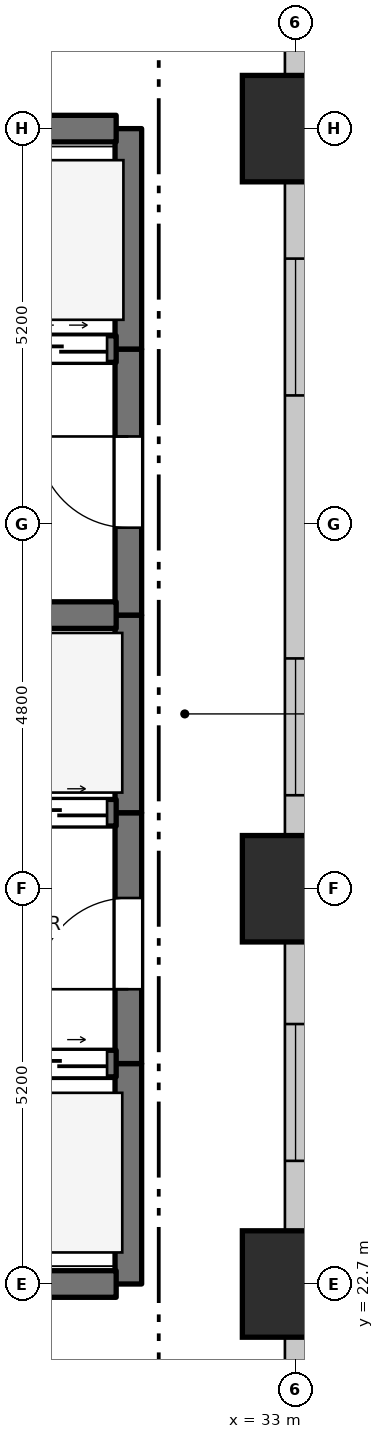
"""IFC4 building model, lengths in metres.
Left out: names, types, materials, properties, quantities, classifications, styles, units other than length and angle.
Written with IfcOpenShell. Run it as: python <this file> out.ifc"""

import sys

from ifc_helpers import new_model, si_unit, direction, frame, frame_2d, origin, origin_2d, place, context, subcontext, project, spatial, rectangle, extrude, element, fill, save


model = new_model("IFC4")
c1 = context("Model", 3, precision=1e-05, world=origin(), true_north=direction((0.0, 1.0)))
c2 = subcontext(c1, "Body", "Model", "MODEL_VIEW")
j1 = project(units=[si_unit("LENGTHUNIT", "METRE"), si_unit("PLANEANGLEUNIT", "RADIAN")], contexts=[c1])
p1 = place(None, origin())
s1 = spatial("IfcSite", under=j1, at=p1, CompositionType="ELEMENT")
p2 = place(p1, origin())
s2 = spatial("IfcBuilding", under=s1, at=p2, CompositionType="ELEMENT")
p3 = place(p2, frame((0.0, 0.0, 6.5)))
s3 = spatial("IfcBuildingStorey", under=s2, at=p3, CompositionType="ELEMENT", Elevation=6.5)
for number, where, z_axis, x_axis in (
    (1, (33.0, 22.7, 0.0), (0.0, 0.0, 1.0), (1.0, 0.0, 0.0)),
    (2, (33.0, 27.9, 0.0), (0.0, 0.0, 1.0), (1.0, 0.0, 0.0)),
    (3, (33.0, 37.9, 0.0), (0.0, 0.0, 1.0), (1.0, 0.0, 0.0)),
):
    element("IfcColumn", number, at=place(p3, frame(where, z_axis=z_axis, x_axis=x_axis)), inside=s3, PredefinedType="PILASTER", context=c2, shape_type="SweptSolid", body=[
        extrude(rectangle(XDim=1.4, YDim=1.4, at=origin_2d()), origin(), (0.0, 0.0, 1.0), 6.5),
    ])
p4 = place(p3, frame((33.0, 54.1, 0.0), z_axis=(0.0, 0.0, 1.0), x_axis=(0.0, -1.0, 0.0)))
e4 = element("IfcWall", 4, at=p4, inside=s3, PredefinedType="STANDARD", context=c2, shape_type="SweptSolid", body=[
    extrude(rectangle(XDim=26.2, YDim=0.28, at=frame_2d((13.1, 0.0))), origin(), (0.0, 0.0, 1.0), 5.57),
])
p5 = place(p4, frame((2.13, 0.0, 0.95)))
e5 = element("IfcOpeningElement", 5, at=p5, cuts=e4, PredefinedType="OPENING", context=c2, shape_type="SweptSolid", body=[
    extrude(rectangle(XDim=1.8, YDim=1.8, at=frame_2d((0.9, 0.9))), frame((0.0, 0.15, 0.0), z_axis=(0.0, -1.0, 0.0), x_axis=(1.0, 0.0, 0.0)), (0.0, 0.0, 1.0), 0.3),
])
p6 = place(p4, frame((7.39, 0.0, 0.95)))
e6 = element("IfcOpeningElement", 6, at=p6, cuts=e4, PredefinedType="OPENING", context=c2, shape_type="SweptSolid", body=[
    extrude(rectangle(XDim=1.8, YDim=1.8, at=frame_2d((0.9, 0.9))), frame((0.0, 0.15, 0.0), z_axis=(0.0, -1.0, 0.0), x_axis=(1.0, 0.0, 0.0)), (0.0, 0.0, 1.0), 0.3),
])
p7 = place(p4, frame((12.65, 0.0, 0.95)))
e7 = element("IfcOpeningElement", 7, at=p7, cuts=e4, PredefinedType="OPENING", context=c2, shape_type="SweptSolid", body=[
    extrude(rectangle(XDim=1.8, YDim=1.8, at=frame_2d((0.9, 0.9))), frame((0.0, 0.15, 0.0), z_axis=(0.0, -1.0, 0.0), x_axis=(1.0, 0.0, 0.0)), (0.0, 0.0, 1.0), 0.3),
])
p8 = place(p4, frame((17.91, 0.0, 0.95)))
e8 = element("IfcOpeningElement", 8, at=p8, cuts=e4, PredefinedType="OPENING", context=c2, shape_type="SweptSolid", body=[
    extrude(rectangle(XDim=1.8, YDim=1.8, at=frame_2d((0.9, 0.9))), frame((0.0, 0.15, 0.0), z_axis=(0.0, -1.0, 0.0), x_axis=(1.0, 0.0, 0.0)), (0.0, 0.0, 1.0), 0.3),
])
p9 = place(p4, frame((23.17, 0.0, 0.95)))
e9 = element("IfcOpeningElement", 9, at=p9, cuts=e4, PredefinedType="OPENING", context=c2, shape_type="SweptSolid", body=[
    extrude(rectangle(XDim=1.8, YDim=1.8, at=frame_2d((0.9, 0.9))), frame((0.0, 0.15, 0.0), z_axis=(0.0, -1.0, 0.0), x_axis=(1.0, 0.0, 0.0)), (0.0, 0.0, 1.0), 0.3),
])
p10 = place(p3, frame((30.8, 22.7, 0.0), z_axis=(0.0, 0.0, 1.0), x_axis=(0.0, 1.0, 0.0)))
e10 = element("IfcWall", 10, at=p10, inside=s3, PredefinedType="SHEAR", context=c2, shape_type="SweptSolid", body=[
    extrude(rectangle(XDim=2.9, YDim=0.35, at=frame_2d((1.45, 0.0))), origin(), (0.0, 0.0, 1.0), 6.17),
])
p11 = place(p3, frame((30.8, 25.6, 0.0), z_axis=(0.0, 0.0, 1.0), x_axis=(0.0, 1.0, 0.0)))
e11 = element("IfcWall", 11, at=p11, inside=s3, PredefinedType="SHEAR", context=c2, shape_type="SweptSolid", body=[
    extrude(rectangle(XDim=3.3, YDim=0.35, at=frame_2d((1.65, 0.0))), origin(), (0.0, 0.0, 1.0), 6.17),
])
p12 = place(p11, frame((0.978, 0.0, 0.0)))
e12 = element("IfcOpeningElement", 12, at=p12, cuts=e11, PredefinedType="OPENING", context=c2, shape_type="SweptSolid", body=[
    extrude(rectangle(XDim=1.2, YDim=2.2, at=frame_2d((0.6, 1.1))), frame((0.0, 0.185, 0.0), z_axis=(0.0, -1.0, 0.0), x_axis=(1.0, 0.0, 0.0)), (0.0, 0.0, 1.0), 0.37),
])
p13 = place(p3, frame((30.8, 28.9, 0.0), z_axis=(0.0, 0.0, 1.0), x_axis=(0.0, 1.0, 0.0)))
e13 = element("IfcWall", 13, at=p13, inside=s3, PredefinedType="SHEAR", context=c2, shape_type="SweptSolid", body=[
    extrude(rectangle(XDim=2.6, YDim=0.35, at=frame_2d((1.3, 0.0))), origin(), (0.0, 0.0, 1.0), 6.17),
])
p14 = place(p3, frame((30.8, 31.5, 0.0), z_axis=(0.0, 0.0, 1.0), x_axis=(0.0, 1.0, 0.0)))
e14 = element("IfcWall", 14, at=p14, inside=s3, PredefinedType="SHEAR", context=c2, shape_type="SweptSolid", body=[
    extrude(rectangle(XDim=3.5, YDim=0.35, at=frame_2d((1.75, 0.0))), origin(), (0.0, 0.0, 1.0), 6.17),
])
p15 = place(p14, frame((1.15, 0.0, 0.0)))
e15 = element("IfcOpeningElement", 15, at=p15, cuts=e14, PredefinedType="OPENING", context=c2, shape_type="SweptSolid", body=[
    extrude(rectangle(XDim=1.2, YDim=2.2, at=frame_2d((0.6, 1.1))), frame((0.0, 0.185, 0.0), z_axis=(0.0, -1.0, 0.0), x_axis=(1.0, 0.0, 0.0)), (0.0, 0.0, 1.0), 0.37),
])
p16 = place(p3, frame((30.8, 35.0, 0.0), z_axis=(0.0, 0.0, 1.0), x_axis=(0.0, 1.0, 0.0)))
e16 = element("IfcWall", 16, at=p16, inside=s3, PredefinedType="SHEAR", context=c2, shape_type="SweptSolid", body=[
    extrude(rectangle(XDim=2.9, YDim=0.35, at=frame_2d((1.45, 0.0))), origin(), (0.0, 0.0, 1.0), 6.17),
])
p17 = place(p3, frame((27.46, 22.7, 0.0), z_axis=(0.0, 0.0, 1.0), x_axis=(1.0, 0.0, 0.0)))
e17 = element("IfcWall", 17, at=p17, inside=s3, PredefinedType="SHEAR", context=c2, shape_type="SweptSolid", body=[
    extrude(rectangle(XDim=3.18, YDim=0.35, at=frame_2d((1.59, 0.0))), origin(), (0.0, 0.0, 1.0), 6.17),
])
p18 = place(p3, frame((27.46, 25.6, 0.0), z_axis=(0.0, 0.0, 1.0), x_axis=(1.0, 0.0, 0.0)))
e18 = element("IfcWall", 18, at=p18, inside=s3, PredefinedType="SHEAR", context=c2, shape_type="SweptSolid", body=[
    extrude(rectangle(XDim=3.18, YDim=0.35, at=frame_2d((1.59, 0.0))), origin(), (0.0, 0.0, 1.0), 6.17),
])
p19 = place(p18, frame((0.12, 0.0, 0.0)))
e19 = element("IfcOpeningElement", 19, at=p19, cuts=e18, PredefinedType="OPENING", context=c2, shape_type="SweptSolid", body=[
    extrude(rectangle(XDim=1.25, YDim=2.2, at=frame_2d((0.625, 1.1))), frame((0.0, 0.185, 0.0), z_axis=(0.0, -1.0, 0.0), x_axis=(1.0, 0.0, 0.0)), (0.0, 0.0, 1.0), 0.37),
])
p20 = place(p18, frame((1.81, 0.0, 0.0)))
e20 = element("IfcOpeningElement", 20, at=p20, cuts=e18, PredefinedType="OPENING", context=c2, shape_type="SweptSolid", body=[
    extrude(rectangle(XDim=1.25, YDim=2.2, at=frame_2d((0.625, 1.1))), frame((0.0, 0.185, 0.0), z_axis=(0.0, -1.0, 0.0), x_axis=(1.0, 0.0, 0.0)), (0.0, 0.0, 1.0), 0.37),
])
p21 = place(p3, frame((27.46, 28.9, 0.0), z_axis=(0.0, 0.0, 1.0), x_axis=(1.0, 0.0, 0.0)))
e21 = element("IfcWall", 21, at=p21, inside=s3, PredefinedType="SHEAR", context=c2, shape_type="SweptSolid", body=[
    extrude(rectangle(XDim=3.18, YDim=0.35, at=frame_2d((1.59, 0.0))), origin(), (0.0, 0.0, 1.0), 6.17),
])
p22 = place(p21, frame((0.12, 0.0, 0.0)))
e22 = element("IfcOpeningElement", 22, at=p22, cuts=e21, PredefinedType="OPENING", context=c2, shape_type="SweptSolid", body=[
    extrude(rectangle(XDim=1.25, YDim=2.2, at=frame_2d((0.625, 1.1))), frame((0.0, 0.185, 0.0), z_axis=(0.0, -1.0, 0.0), x_axis=(1.0, 0.0, 0.0)), (0.0, 0.0, 1.0), 0.37),
])
p23 = place(p21, frame((1.81, 0.0, 0.0)))
e23 = element("IfcOpeningElement", 23, at=p23, cuts=e21, PredefinedType="OPENING", context=c2, shape_type="SweptSolid", body=[
    extrude(rectangle(XDim=1.25, YDim=2.2, at=frame_2d((0.625, 1.1))), frame((0.0, 0.185, 0.0), z_axis=(0.0, -1.0, 0.0), x_axis=(1.0, 0.0, 0.0)), (0.0, 0.0, 1.0), 0.37),
])
p24 = place(p3, frame((27.46, 31.5, 0.0), z_axis=(0.0, 0.0, 1.0), x_axis=(1.0, 0.0, 0.0)))
e24 = element("IfcWall", 24, at=p24, inside=s3, PredefinedType="SHEAR", context=c2, shape_type="SweptSolid", body=[
    extrude(rectangle(XDim=3.18, YDim=0.35, at=frame_2d((1.59, 0.0))), origin(), (0.0, 0.0, 1.0), 6.17),
])
p25 = place(p3, frame((19.16, 35.0, 0.0), z_axis=(0.0, 0.0, 1.0), x_axis=(1.0, 0.0, 0.0)))
e25 = element("IfcWall", 25, at=p25, inside=s3, PredefinedType="SHEAR", context=c2, shape_type="SweptSolid", body=[
    extrude(rectangle(XDim=11.48, YDim=0.35, at=frame_2d((5.74, 0.0))), origin(), (0.0, 0.0, 1.0), 6.17),
])
p26 = place(p25, frame((0.365, 0.0, 0.0)))
e26 = element("IfcOpeningElement", 26, at=p26, cuts=e25, PredefinedType="OPENING", context=c2, shape_type="SweptSolid", body=[
    extrude(rectangle(XDim=1.35, YDim=2.2, at=frame_2d((0.675, 1.1))), frame((0.0, 0.185, 0.0), z_axis=(0.0, -1.0, 0.0), x_axis=(1.0, 0.0, 0.0)), (0.0, 0.0, 1.0), 0.37),
])
p27 = place(p25, frame((2.765, 0.0, 0.0)))
e27 = element("IfcOpeningElement", 27, at=p27, cuts=e25, PredefinedType="OPENING", context=c2, shape_type="SweptSolid", body=[
    extrude(rectangle(XDim=1.35, YDim=2.2, at=frame_2d((0.675, 1.1))), frame((0.0, 0.185, 0.0), z_axis=(0.0, -1.0, 0.0), x_axis=(1.0, 0.0, 0.0)), (0.0, 0.0, 1.0), 0.37),
])
p28 = place(p25, frame((4.915, 0.0, 0.0)))
e28 = element("IfcOpeningElement", 28, at=p28, cuts=e25, PredefinedType="OPENING", context=c2, shape_type="SweptSolid", body=[
    extrude(rectangle(XDim=1.2, YDim=2.2, at=frame_2d((0.6, 1.1))), frame((0.0, 0.185, 0.0), z_axis=(0.0, -1.0, 0.0), x_axis=(1.0, 0.0, 0.0)), (0.0, 0.0, 1.0), 0.37),
])
p29 = place(p25, frame((6.665, 0.0, 0.0)))
e29 = element("IfcOpeningElement", 29, at=p29, cuts=e25, PredefinedType="OPENING", context=c2, shape_type="SweptSolid", body=[
    extrude(rectangle(XDim=1.2, YDim=2.2, at=frame_2d((0.6, 1.1))), frame((0.0, 0.185, 0.0), z_axis=(0.0, -1.0, 0.0), x_axis=(1.0, 0.0, 0.0)), (0.0, 0.0, 1.0), 0.37),
])
p30 = place(p25, frame((8.415, 0.0, 0.0)))
e30 = element("IfcOpeningElement", 30, at=p30, cuts=e25, PredefinedType="OPENING", context=c2, shape_type="SweptSolid", body=[
    extrude(rectangle(XDim=1.2, YDim=2.2, at=frame_2d((0.6, 1.1))), frame((0.0, 0.185, 0.0), z_axis=(0.0, -1.0, 0.0), x_axis=(1.0, 0.0, 0.0)), (0.0, 0.0, 1.0), 0.37),
])
p31 = place(p25, frame((10.16, 0.0, 0.0)))
e31 = element("IfcOpeningElement", 31, at=p31, cuts=e25, PredefinedType="OPENING", context=c2, shape_type="SweptSolid", body=[
    extrude(rectangle(XDim=1.2, YDim=2.2, at=frame_2d((0.6, 1.1))), frame((0.0, 0.185, 0.0), z_axis=(0.0, -1.0, 0.0), x_axis=(1.0, 0.0, 0.0)), (0.0, 0.0, 1.0), 0.37),
])
p32 = place(p3, frame((19.16, 37.9, 0.0), z_axis=(0.0, 0.0, 1.0), x_axis=(1.0, 0.0, 0.0)))
e32 = element("IfcWall", 32, at=p32, inside=s3, PredefinedType="SHEAR", context=c2, shape_type="SweptSolid", body=[
    extrude(rectangle(XDim=11.48, YDim=0.35, at=frame_2d((5.74, 0.0))), origin(), (0.0, 0.0, 1.0), 6.17),
])
p33 = place(p3, frame((33.0, 27.9, 0.0), z_axis=(0.0, 0.0, 1.0), x_axis=(0.0, -1.0, 0.0)))
e33 = element("IfcWall", 33, at=p33, inside=s3, PredefinedType="STANDARD", context=c2, shape_type="SweptSolid", body=[
    extrude(rectangle(XDim=27.2, YDim=0.28, at=frame_2d((13.6, 0.0))), origin(), (0.0, 0.0, 1.0), 5.67),
])
p34 = place(p33, frame((1.78, 0.0, 0.95)))
e34 = element("IfcOpeningElement", 34, at=p34, cuts=e33, PredefinedType="OPENING", context=c2, shape_type="SweptSolid", body=[
    extrude(rectangle(XDim=1.8, YDim=1.8, at=frame_2d((0.9, 0.9))), frame((0.0, 0.15, 0.0), z_axis=(0.0, -1.0, 0.0), x_axis=(1.0, 0.0, 0.0)), (0.0, 0.0, 1.0), 0.3),
])
p35 = place(p33, frame((6.64, 0.0, 0.95)))
e35 = element("IfcOpeningElement", 35, at=p35, cuts=e33, PredefinedType="OPENING", context=c2, shape_type="SweptSolid", body=[
    extrude(rectangle(XDim=1.8, YDim=1.8, at=frame_2d((0.9, 0.9))), frame((0.0, 0.15, 0.0), z_axis=(0.0, -1.0, 0.0), x_axis=(1.0, 0.0, 0.0)), (0.0, 0.0, 1.0), 0.3),
])
p36 = place(p33, frame((11.9, 0.0, 0.95)))
e36 = element("IfcOpeningElement", 36, at=p36, cuts=e33, PredefinedType="OPENING", context=c2, shape_type="SweptSolid", body=[
    extrude(rectangle(XDim=1.8, YDim=1.8, at=frame_2d((0.9, 0.9))), frame((0.0, 0.15, 0.0), z_axis=(0.0, -1.0, 0.0), x_axis=(1.0, 0.0, 0.0)), (0.0, 0.0, 1.0), 0.3),
])
p37 = place(p33, frame((18.01, 0.0, 0.95)))
e37 = element("IfcOpeningElement", 37, at=p37, cuts=e33, PredefinedType="OPENING", context=c2, shape_type="SweptSolid", body=[
    extrude(rectangle(XDim=1.8, YDim=1.8, at=frame_2d((0.9, 0.9))), frame((0.0, 0.15, 0.0), z_axis=(0.0, -1.0, 0.0), x_axis=(1.0, 0.0, 0.0)), (0.0, 0.0, 1.0), 0.3),
])
p38 = place(p33, frame((23.27, 0.0, 0.95)))
e38 = element("IfcOpeningElement", 38, at=p38, cuts=e33, PredefinedType="OPENING", context=c2, shape_type="SweptSolid", body=[
    extrude(rectangle(XDim=1.8, YDim=1.8, at=frame_2d((0.9, 0.9))), frame((0.0, 0.15, 0.0), z_axis=(0.0, -1.0, 0.0), x_axis=(1.0, 0.0, 0.0)), (0.0, 0.0, 1.0), 0.3),
])
p39 = place(p8, origin())
e39 = element("IfcWindow", 39, at=p39, inside=s3, PartitioningType="DOUBLE_PANEL_VERTICAL", PredefinedType="WINDOW", context=c2, shape_type="SweptSolid", body=[
    extrude(rectangle(XDim=1.8, YDim=1.8, at=frame_2d((0.9, 0.9))), frame((0.0, 0.03, 0.0), z_axis=(0.0, -1.0, 0.0), x_axis=(1.0, 0.0, 0.0)), (0.0, 0.0, 1.0), 0.06),
])
fill(e8, e39)
p40 = place(p9, origin())
e40 = element("IfcWindow", 40, at=p40, inside=s3, PartitioningType="DOUBLE_PANEL_VERTICAL", PredefinedType="WINDOW", context=c2, shape_type="SweptSolid", body=[
    extrude(rectangle(XDim=1.8, YDim=1.8, at=frame_2d((0.9, 0.9))), frame((0.0, 0.03, 0.0), z_axis=(0.0, -1.0, 0.0), x_axis=(1.0, 0.0, 0.0)), (0.0, 0.0, 1.0), 0.06),
])
fill(e9, e40)
p41 = place(p34, origin())
e41 = element("IfcWindow", 41, at=p41, inside=s3, PartitioningType="DOUBLE_PANEL_VERTICAL", PredefinedType="WINDOW", context=c2, shape_type="SweptSolid", body=[
    extrude(rectangle(XDim=1.8, YDim=1.8, at=frame_2d((0.9, 0.9))), frame((0.0, 0.03, 0.0), z_axis=(0.0, -1.0, 0.0), x_axis=(1.0, 0.0, 0.0)), (0.0, 0.0, 1.0), 0.06),
])
fill(e34, e41)
p42 = place(p12, origin())
e42 = element("IfcDoor", 42, at=p42, inside=s3, OperationType="SINGLE_SWING_LEFT", PredefinedType="DOOR", context=c2, shape_type="SweptSolid", body=[
    extrude(rectangle(XDim=1.2, YDim=2.2, at=frame_2d((0.6, 1.1))), frame((0.0, 0.025, 0.0), z_axis=(0.0, -1.0, 0.0), x_axis=(1.0, 0.0, 0.0)), (0.0, 0.0, 1.0), 0.05),
])
fill(e12, e42)
p43 = place(p15, origin())
e43 = element("IfcDoor", 43, at=p43, inside=s3, OperationType="SINGLE_SWING_RIGHT", PredefinedType="DOOR", context=c2, shape_type="SweptSolid", body=[
    extrude(rectangle(XDim=1.2, YDim=2.2, at=frame_2d((0.6, 1.1))), frame((0.0, 0.025, 0.0), z_axis=(0.0, -1.0, 0.0), x_axis=(1.0, 0.0, 0.0)), (0.0, 0.0, 1.0), 0.05),
])
fill(e15, e43)
p44 = place(p20, origin())
e44 = element("IfcDoor", 44, at=p44, inside=s3, OperationType="DOUBLE_DOOR_SLIDING", PredefinedType="DOOR", context=c2, shape_type="SweptSolid", body=[
    extrude(rectangle(XDim=1.25, YDim=2.2, at=frame_2d((0.625, 1.1))), frame((0.0, 0.025, 0.0), z_axis=(0.0, -1.0, 0.0), x_axis=(1.0, 0.0, 0.0)), (0.0, 0.0, 1.0), 0.05),
])
fill(e20, e44)
p45 = place(p23, origin())
e45 = element("IfcDoor", 45, at=p45, inside=s3, OperationType="DOUBLE_DOOR_SLIDING", PredefinedType="DOOR", context=c2, shape_type="SweptSolid", body=[
    extrude(rectangle(XDim=1.25, YDim=2.2, at=frame_2d((0.625, 1.1))), frame((0.0, 0.025, 0.0), z_axis=(0.0, -1.0, 0.0), x_axis=(1.0, 0.0, 0.0)), (0.0, 0.0, 1.0), 0.05),
])
fill(e23, e45)
p46 = place(p31, origin())
e46 = element("IfcDoor", 46, at=p46, inside=s3, OperationType="DOUBLE_DOOR_SLIDING", PredefinedType="DOOR", context=c2, shape_type="SweptSolid", body=[
    extrude(rectangle(XDim=1.2, YDim=2.2, at=frame_2d((0.6, 1.1))), frame((0.0, 0.025, 0.0), z_axis=(0.0, -1.0, 0.0), x_axis=(1.0, 0.0, 0.0)), (0.0, 0.0, 1.0), 0.05),
])
fill(e31, e46)
save(model, sys.argv[1])
